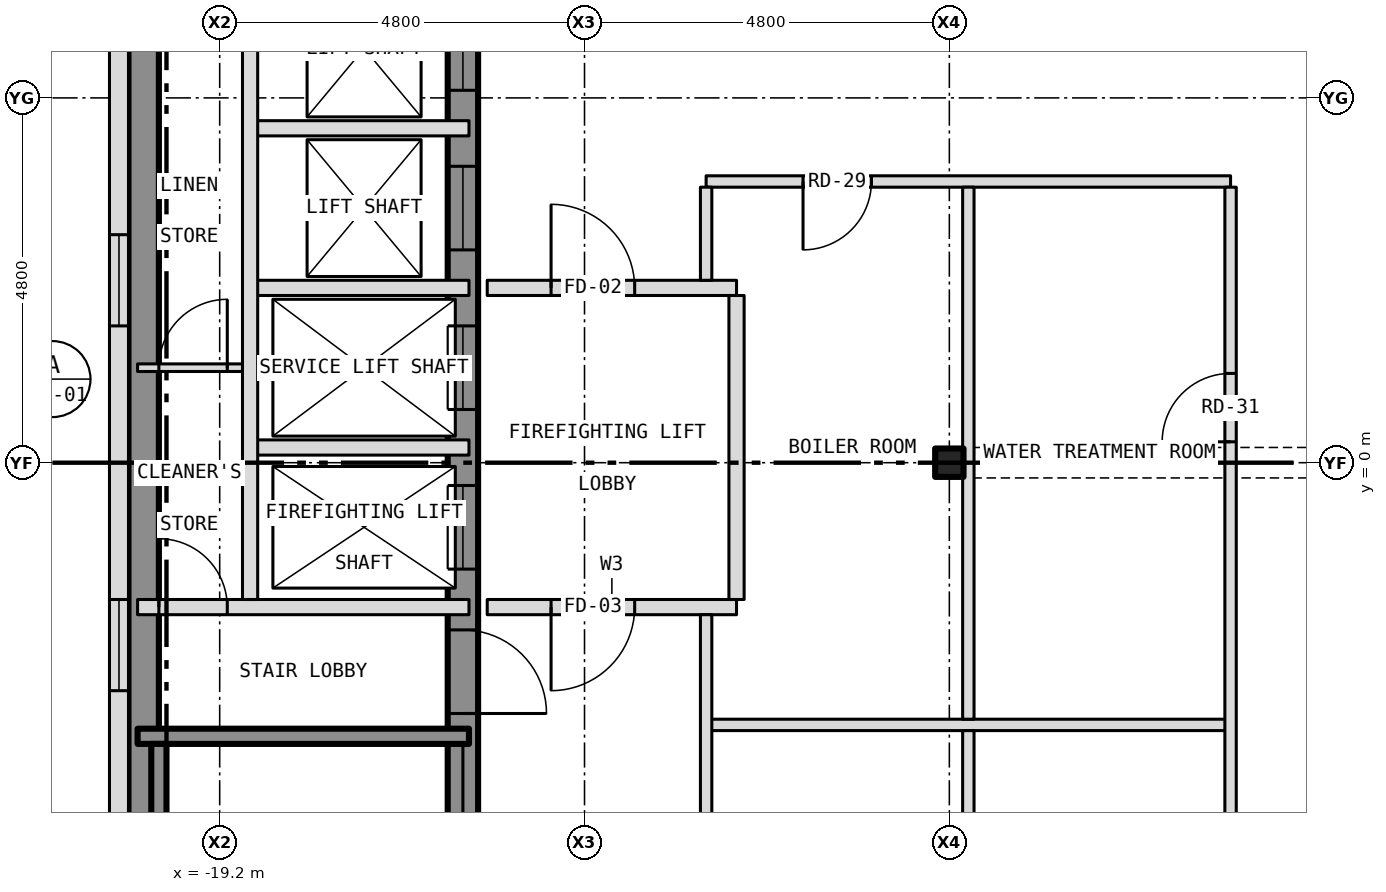
"""IFC4 building model, lengths in metres.
Left out: names, types, materials, properties, quantities, classifications, styles, units other than length and angle.
Written with IfcOpenShell. Run it as: python <this file> out.ifc"""

import sys

from ifc_helpers import new_model, si_unit, direction, frame, frame_2d, origin, origin_2d, place, context, subcontext, project, spatial, rectangle, i_section, extrude, element, fill, save


model = new_model("IFC4")
c1 = context("Model", 3, precision=1e-05, world=origin(), true_north=direction((0.0, 1.0)))
c2 = subcontext(c1, "Body", "Model", "MODEL_VIEW")
j1 = project(units=[si_unit("LENGTHUNIT", "METRE"), si_unit("PLANEANGLEUNIT", "RADIAN")], contexts=[c1])
p1 = place(None, origin())
s1 = spatial("IfcSite", under=j1, at=p1, CompositionType="ELEMENT")
p2 = place(p1, origin())
s2 = spatial("IfcBuilding", under=s1, at=p2, CompositionType="ELEMENT")
p3 = place(p2, frame((0.0, 0.0, 236.5)))
s3 = spatial("IfcBuildingStorey", under=s2, at=p3, CompositionType="ELEMENT", Elevation=236.5)
p4 = place(p3, frame((-9.6, 0.0, -0.3), z_axis=(0.0, 0.0, 1.0), x_axis=(1.0, 0.0, 0.0)))
e1 = element("IfcColumn", 1, at=p4, inside=s3, PredefinedType="COLUMN", context=c2, shape_type="SweptSolid", body=[
    extrude(i_section(OverallWidth=0.373, OverallDepth=0.373, WebThickness=0.016, FlangeThickness=0.026, at=origin_2d()), origin(), (0.0, 0.0, 1.0), 4.65),
])
p5 = place(p3, frame((-16.0, -10.8, 0.0), z_axis=(0.0, 0.0, 1.0), x_axis=(0.0, 1.0, 0.0)))
e2 = element("IfcWall", 2, at=p5, inside=s3, PredefinedType="SHEAR", context=c2, shape_type="SweptSolid", body=[
    extrude(rectangle(XDim=21.6, YDim=0.4, at=frame_2d((10.8, 0.0))), origin(), (0.0, 0.0, 1.0), 3.9),
])
p6 = place(p5, frame((9.4, 0.0, 0.0)))
e3 = element("IfcOpeningElement", 3, at=p6, cuts=e2, PredefinedType="OPENING", context=c2, shape_type="SweptSolid", body=[
    extrude(rectangle(XDim=1.1, YDim=2.1, at=frame_2d((0.55, 1.05))), frame((0.0, 0.212, 0.0), z_axis=(0.0, -1.0, 0.0), x_axis=(1.0, 0.0, 0.0)), (0.0, 0.0, 1.0), 0.424),
])
p7 = place(p5, frame((11.5, 0.0, 0.0)))
e4 = element("IfcOpeningElement", 4, at=p7, cuts=e2, PredefinedType="OPENING", context=c2, shape_type="SweptSolid", body=[
    extrude(rectangle(XDim=1.1, YDim=2.1, at=frame_2d((0.55, 1.05))), frame((0.0, 0.212, 0.0), z_axis=(0.0, -1.0, 0.0), x_axis=(1.0, 0.0, 0.0)), (0.0, 0.0, 1.0), 0.424),
])
p8 = place(p5, frame((13.6, 0.0, 0.0)))
e5 = element("IfcOpeningElement", 5, at=p8, cuts=e2, PredefinedType="OPENING", context=c2, shape_type="SweptSolid", body=[
    extrude(rectangle(XDim=1.1, YDim=2.1, at=frame_2d((0.55, 1.05))), frame((0.0, 0.212, 0.0), z_axis=(0.0, -1.0, 0.0), x_axis=(1.0, 0.0, 0.0)), (0.0, 0.0, 1.0), 0.424),
])
p9 = place(p5, frame((15.7, 0.0, 0.0)))
e6 = element("IfcOpeningElement", 6, at=p9, cuts=e2, PredefinedType="OPENING", context=c2, shape_type="SweptSolid", body=[
    extrude(rectangle(XDim=1.1, YDim=2.1, at=frame_2d((0.55, 1.05))), frame((0.0, 0.212, 0.0), z_axis=(0.0, -1.0, 0.0), x_axis=(1.0, 0.0, 0.0)), (0.0, 0.0, 1.0), 0.424),
])
p10 = place(p5, frame((17.8, 0.0, 0.0)))
e7 = element("IfcOpeningElement", 7, at=p10, cuts=e2, PredefinedType="OPENING", context=c2, shape_type="SweptSolid", body=[
    extrude(rectangle(XDim=1.1, YDim=2.1, at=frame_2d((0.55, 1.05))), frame((0.0, 0.212, 0.0), z_axis=(0.0, -1.0, 0.0), x_axis=(1.0, 0.0, 0.0)), (0.0, 0.0, 1.0), 0.424),
])
p11 = place(p5, frame((0.458, 0.0, 0.0)))
e8 = element("IfcOpeningElement", 8, at=p11, cuts=e2, PredefinedType="OPENING", context=c2, shape_type="SweptSolid", body=[
    extrude(rectangle(XDim=1.1, YDim=2.1, at=frame_2d((0.55, 1.05))), frame((0.0, 0.212, 0.0), z_axis=(0.0, -1.0, 0.0), x_axis=(1.0, 0.0, 0.0)), (0.0, 0.0, 1.0), 0.424),
])
p12 = place(p5, frame((7.5, 0.0, 0.0)))
e9 = element("IfcOpeningElement", 9, at=p12, cuts=e2, PredefinedType="OPENING", context=c2, shape_type="SweptSolid", body=[
    extrude(rectangle(XDim=1.1, YDim=2.1, at=frame_2d((0.55, 1.05))), frame((0.0, 0.212, 0.0), z_axis=(0.0, -1.0, 0.0), x_axis=(1.0, 0.0, 0.0)), (0.0, 0.0, 1.0), 0.424),
])
p13 = place(p5, frame((20.0, 0.0, 0.0)))
e10 = element("IfcOpeningElement", 10, at=p13, cuts=e2, PredefinedType="OPENING", context=c2, shape_type="SweptSolid", body=[
    extrude(rectangle(XDim=0.9, YDim=2.1, at=frame_2d((0.45, 1.05))), frame((0.0, 0.212, 0.0), z_axis=(0.0, -1.0, 0.0), x_axis=(1.0, 0.0, 0.0)), (0.0, 0.0, 1.0), 0.424),
])
p14 = place(p3, frame((-20.2, -10.8, 0.0), z_axis=(0.0, 0.0, 1.0), x_axis=(0.0, 1.0, 0.0)))
e11 = element("IfcWall", 11, at=p14, inside=s3, PredefinedType="SHEAR", context=c2, shape_type="SweptSolid", body=[
    extrude(rectangle(XDim=21.6, YDim=0.4, at=frame_2d((10.8, 0.0))), origin(), (0.0, 0.0, 1.0), 3.9),
])
p15 = place(p3, frame((-20.525, 10.8, 0.0), z_axis=(0.0, 0.0, 1.0), x_axis=(0.0, -1.0, 0.0)))
e12 = element("IfcWall", 12, at=p15, inside=s3, PredefinedType="SOLIDWALL", context=c2, shape_type="SweptSolid", body=[
    extrude(rectangle(XDim=21.6, YDim=0.25, at=frame_2d((10.8, 0.0))), origin(), (0.0, 0.0, 1.0), 4.5),
])
p16 = place(p15, frame((3.0, 0.0, 2.2)))
e13 = element("IfcOpeningElement", 13, at=p16, cuts=e12, PredefinedType="OPENING", context=c2, shape_type="SweptSolid", body=[
    extrude(rectangle(XDim=1.2, YDim=0.6, at=frame_2d((0.6, 0.3))), frame((0.0, 0.137, 0.0), z_axis=(0.0, -1.0, 0.0), x_axis=(1.0, 0.0, 0.0)), (0.0, 0.0, 1.0), 0.274),
])
p17 = place(p15, frame((7.8, 0.0, 2.2)))
e14 = element("IfcOpeningElement", 14, at=p17, cuts=e12, PredefinedType="OPENING", context=c2, shape_type="SweptSolid", body=[
    extrude(rectangle(XDim=1.2, YDim=0.6, at=frame_2d((0.6, 0.3))), frame((0.0, 0.137, 0.0), z_axis=(0.0, -1.0, 0.0), x_axis=(1.0, 0.0, 0.0)), (0.0, 0.0, 1.0), 0.274),
])
p18 = place(p15, frame((12.6, 0.0, 2.2)))
e15 = element("IfcOpeningElement", 15, at=p18, cuts=e12, PredefinedType="OPENING", context=c2, shape_type="SweptSolid", body=[
    extrude(rectangle(XDim=1.2, YDim=0.6, at=frame_2d((0.6, 0.3))), frame((0.0, 0.137, 0.0), z_axis=(0.0, -1.0, 0.0), x_axis=(1.0, 0.0, 0.0)), (0.0, 0.0, 1.0), 0.274),
])
p19 = place(p15, frame((17.4, 0.0, 2.2)))
e16 = element("IfcOpeningElement", 16, at=p19, cuts=e12, PredefinedType="OPENING", context=c2, shape_type="SweptSolid", body=[
    extrude(rectangle(XDim=1.2, YDim=0.6, at=frame_2d((0.6, 0.3))), frame((0.0, 0.137, 0.0), z_axis=(0.0, -1.0, 0.0), x_axis=(1.0, 0.0, 0.0)), (0.0, 0.0, 1.0), 0.274),
])
p20 = place(p3, frame((-20.28, -3.6, 0.0), z_axis=(0.0, 0.0, 1.0), x_axis=(1.0, 0.0, 0.0)))
e17 = element("IfcWall", 17, at=p20, inside=s3, PredefinedType="SHEAR", context=c2, shape_type="SweptSolid", body=[
    extrude(rectangle(XDim=4.36, YDim=0.2, at=frame_2d((2.18, 0.0))), origin(), (0.0, 0.0, 1.0), 3.9),
])
p21 = place(p3, frame((-12.8, -3.45, 0.0), z_axis=(0.0, 0.0, 1.0), x_axis=(1.0, 0.0, 0.0)))
e18 = element("IfcWall", 18, at=p21, inside=s3, PredefinedType="PARTITIONING", context=c2, shape_type="SweptSolid", body=[
    extrude(rectangle(XDim=6.9, YDim=0.15, at=frame_2d((3.45, 0.0))), origin(), (0.0, 0.0, 1.0), 4.35),
])
p22 = place(p3, frame((-20.28, -1.9, 0.0), z_axis=(0.0, 0.0, 1.0), x_axis=(1.0, 0.0, 0.0)))
e19 = element("IfcWall", 19, at=p22, inside=s3, PredefinedType="PARTITIONING", context=c2, shape_type="SweptSolid", body=[
    extrude(rectangle(XDim=4.36, YDim=0.2, at=frame_2d((2.18, 0.0))), origin(), (0.0, 0.0, 1.0), 3.9),
])
p23 = place(p22, frame((0.28, 0.0, 0.0)))
e20 = element("IfcOpeningElement", 20, at=p23, cuts=e19, PredefinedType="OPENING", context=c2, shape_type="SweptSolid", body=[
    extrude(rectangle(XDim=0.9, YDim=2.1, at=frame_2d((0.45, 1.05))), frame((0.0, 0.112, 0.0), z_axis=(0.0, -1.0, 0.0), x_axis=(1.0, 0.0, 0.0)), (0.0, 0.0, 1.0), 0.224),
])
p24 = place(p3, frame((-15.68, -1.9, 0.0), z_axis=(0.0, 0.0, 1.0), x_axis=(1.0, 0.0, 0.0)))
e21 = element("IfcWall", 21, at=p24, inside=s3, PredefinedType="PARTITIONING", context=c2, shape_type="SweptSolid", body=[
    extrude(rectangle(XDim=3.28, YDim=0.2, at=frame_2d((1.64, 0.0))), origin(), (0.0, 0.0, 1.0), 4.35),
])
p25 = place(p24, frame((0.84, 0.0, 0.0)))
e22 = element("IfcOpeningElement", 22, at=p25, cuts=e21, PredefinedType="OPENING", context=c2, shape_type="SweptSolid", body=[
    extrude(rectangle(XDim=1.1, YDim=2.1, at=frame_2d((0.55, 1.05))), frame((0.0, 0.112, 0.0), z_axis=(0.0, -1.0, 0.0), x_axis=(1.0, 0.0, 0.0)), (0.0, 0.0, 1.0), 0.224),
])
p26 = place(p3, frame((-18.8, 0.2, 0.0), z_axis=(0.0, 0.0, 1.0), x_axis=(1.0, 0.0, 0.0)))
e23 = element("IfcWall", 23, at=p26, inside=s3, PredefinedType="PARTITIONING", context=c2, shape_type="SweptSolid", body=[
    extrude(rectangle(XDim=2.88, YDim=0.2, at=frame_2d((1.44, 0.0))), origin(), (0.0, 0.0, 1.0), 3.9),
])
p27 = place(p3, frame((-20.28, 1.25, 0.0), z_axis=(0.0, 0.0, 1.0), x_axis=(1.0, 0.0, 0.0)))
e24 = element("IfcWall", 24, at=p27, inside=s3, PredefinedType="PARTITIONING", context=c2, shape_type="SweptSolid", body=[
    extrude(rectangle(XDim=1.48, YDim=0.1, at=frame_2d((0.74, 0.0))), origin(), (0.0, 0.0, 1.0), 3.9),
])
p28 = place(p27, frame((0.28, 0.0, 0.0)))
e25 = element("IfcOpeningElement", 25, at=p28, cuts=e24, PredefinedType="OPENING", context=c2, shape_type="SweptSolid", body=[
    extrude(rectangle(XDim=0.9, YDim=2.1, at=frame_2d((0.45, 1.05))), frame((0.0, 0.062, 0.0), z_axis=(0.0, -1.0, 0.0), x_axis=(1.0, 0.0, 0.0)), (0.0, 0.0, 1.0), 0.124),
])
p29 = place(p3, frame((-18.8, 2.3, 0.0), z_axis=(0.0, 0.0, 1.0), x_axis=(1.0, 0.0, 0.0)))
e26 = element("IfcWall", 26, at=p29, inside=s3, PredefinedType="PARTITIONING", context=c2, shape_type="SweptSolid", body=[
    extrude(rectangle(XDim=2.88, YDim=0.2, at=frame_2d((1.44, 0.0))), origin(), (0.0, 0.0, 1.0), 3.9),
])
p30 = place(p3, frame((-15.68, 2.3, 0.0), z_axis=(0.0, 0.0, 1.0), x_axis=(1.0, 0.0, 0.0)))
e27 = element("IfcWall", 27, at=p30, inside=s3, PredefinedType="PARTITIONING", context=c2, shape_type="SweptSolid", body=[
    extrude(rectangle(XDim=3.28, YDim=0.2, at=frame_2d((1.64, 0.0))), origin(), (0.0, 0.0, 1.0), 4.35),
])
p31 = place(p30, frame((0.84, 0.0, 0.0)))
e28 = element("IfcOpeningElement", 28, at=p31, cuts=e27, PredefinedType="OPENING", context=c2, shape_type="SweptSolid", body=[
    extrude(rectangle(XDim=1.1, YDim=2.1, at=frame_2d((0.55, 1.05))), frame((0.0, 0.112, 0.0), z_axis=(0.0, -1.0, 0.0), x_axis=(1.0, 0.0, 0.0)), (0.0, 0.0, 1.0), 0.224),
])
p32 = place(p3, frame((-12.8, 3.7, 0.0), z_axis=(0.0, 0.0, 1.0), x_axis=(1.0, 0.0, 0.0)))
e29 = element("IfcWall", 29, at=p32, inside=s3, PredefinedType="PARTITIONING", context=c2, shape_type="SweptSolid", body=[
    extrude(rectangle(XDim=6.9, YDim=0.15, at=frame_2d((3.45, 0.0))), origin(), (0.0, 0.0, 1.0), 4.35),
])
p33 = place(p32, frame((1.275, 0.0, 0.0)))
e30 = element("IfcOpeningElement", 30, at=p33, cuts=e29, PredefinedType="OPENING", context=c2, shape_type="SweptSolid", body=[
    extrude(rectangle(XDim=0.9, YDim=2.1, at=frame_2d((0.45, 1.05))), frame((0.0, 0.087, 0.0), z_axis=(0.0, -1.0, 0.0), x_axis=(1.0, 0.0, 0.0)), (0.0, 0.0, 1.0), 0.174),
])
p34 = place(p3, frame((-18.8, 4.4, 0.0), z_axis=(0.0, 0.0, 1.0), x_axis=(1.0, 0.0, 0.0)))
e31 = element("IfcWall", 31, at=p34, inside=s3, PredefinedType="PARTITIONING", context=c2, shape_type="SweptSolid", body=[
    extrude(rectangle(XDim=2.88, YDim=0.2, at=frame_2d((1.44, 0.0))), origin(), (0.0, 0.0, 1.0), 3.9),
])
p35 = place(p3, frame((-20.0, -10.68, 0.0), z_axis=(0.0, 0.0, 1.0), x_axis=(0.0, 1.0, 0.0)))
e32 = element("IfcWall", 32, at=p35, inside=s3, PredefinedType="SHEAR", context=c2, shape_type="SweptSolid", body=[
    extrude(rectangle(XDim=6.98, YDim=0.2, at=frame_2d((3.49, 0.0))), origin(), (0.0, 0.0, 1.0), 3.9),
])
p36 = place(p3, frame((-18.8, -1.8, 0.0), z_axis=(0.0, 0.0, 1.0), x_axis=(0.0, 1.0, 0.0)))
e33 = element("IfcWall", 33, at=p36, inside=s3, PredefinedType="PARTITIONING", context=c2, shape_type="SweptSolid", body=[
    extrude(rectangle(XDim=12.48, YDim=0.2, at=frame_2d((6.24, 0.0))), origin(), (0.0, 0.0, 1.0), 3.9),
])
p37 = place(p3, frame((-12.8, -10.525, 0.0), z_axis=(0.0, 0.0, 1.0), x_axis=(0.0, 1.0, 0.0)))
e34 = element("IfcWall", 34, at=p37, inside=s3, PredefinedType="PARTITIONING", context=c2, shape_type="SweptSolid", body=[
    extrude(rectangle(XDim=8.525, YDim=0.15, at=frame_2d((4.262, 0.0))), origin(), (0.0, 0.0, 1.0), 4.35),
])
p38 = place(p37, frame((3.05, 0.0, 0.0)))
e35 = element("IfcOpeningElement", 35, at=p38, cuts=e34, PredefinedType="OPENING", context=c2, shape_type="SweptSolid", body=[
    extrude(rectangle(XDim=0.9, YDim=2.1, at=frame_2d((0.45, 1.05))), frame((0.0, 0.087, 0.0), z_axis=(0.0, -1.0, 0.0), x_axis=(1.0, 0.0, 0.0)), (0.0, 0.0, 1.0), 0.174),
])
p39 = place(p3, frame((-12.8, 2.4, 0.0), z_axis=(0.0, 0.0, 1.0), x_axis=(0.0, 1.0, 0.0)))
e36 = element("IfcWall", 36, at=p39, inside=s3, PredefinedType="PARTITIONING", context=c2, shape_type="SweptSolid", body=[
    extrude(rectangle(XDim=1.225, YDim=0.15, at=frame_2d((0.613, 0.0))), origin(), (0.0, 0.0, 1.0), 4.35),
])
p40 = place(p3, frame((-12.4, -1.8, 0.0), z_axis=(0.0, 0.0, 1.0), x_axis=(0.0, 1.0, 0.0)))
e37 = element("IfcWall", 37, at=p40, inside=s3, PredefinedType="PARTITIONING", context=c2, shape_type="SweptSolid", body=[
    extrude(rectangle(XDim=4.0, YDim=0.2, at=frame_2d((2.0, 0.0))), origin(), (0.0, 0.0, 1.0), 4.35),
])
for number, where, z_axis, x_axis in (
    (38, (-9.35, -10.525, 0.0), (0.0, 0.0, 1.0), (0.0, 1.0, 0.0)),
    (39, (-9.35, -3.375, 0.0), (0.0, 0.0, 1.0), (0.0, 1.0, 0.0)),
):
    element("IfcWall", number, at=place(p3, frame(where, z_axis=z_axis, x_axis=x_axis)), inside=s3, PredefinedType="PARTITIONING", context=c2, shape_type="SweptSolid", body=[
        extrude(rectangle(XDim=7.0, YDim=0.15, at=frame_2d((3.5, 0.0))), origin(), (0.0, 0.0, 1.0), 4.35),
    ])
p41 = place(p3, frame((-5.9, -10.525, 0.0), z_axis=(0.0, 0.0, 1.0), x_axis=(0.0, 1.0, 0.0)))
e40 = element("IfcWall", 40, at=p41, inside=s3, PredefinedType="PARTITIONING", context=c2, shape_type="SweptSolid", body=[
    extrude(rectangle(XDim=14.15, YDim=0.15, at=frame_2d((7.075, 0.0))), origin(), (0.0, 0.0, 1.0), 4.35),
])
p42 = place(p41, frame((3.05, 0.0, 0.0)))
e41 = element("IfcOpeningElement", 41, at=p42, cuts=e40, PredefinedType="OPENING", context=c2, shape_type="SweptSolid", body=[
    extrude(rectangle(XDim=0.9, YDim=2.1, at=frame_2d((0.45, 1.05))), frame((0.0, 0.087, 0.0), z_axis=(0.0, -1.0, 0.0), x_axis=(1.0, 0.0, 0.0)), (0.0, 0.0, 1.0), 0.174),
])
p43 = place(p41, frame((10.8, 0.0, 0.0)))
e42 = element("IfcOpeningElement", 42, at=p43, cuts=e40, PredefinedType="OPENING", context=c2, shape_type="SweptSolid", body=[
    extrude(rectangle(XDim=0.9, YDim=2.1, at=frame_2d((0.45, 1.05))), frame((0.0, 0.087, 0.0), z_axis=(0.0, -1.0, 0.0), x_axis=(1.0, 0.0, 0.0)), (0.0, 0.0, 1.0), 0.174),
])
p44 = place(p17, origin())
e43 = element("IfcWindow", 43, at=p44, inside=s3, PartitioningType="SINGLE_PANEL", PredefinedType="WINDOW", context=c2, shape_type="SweptSolid", body=[
    extrude(rectangle(XDim=1.2, YDim=0.6, at=frame_2d((0.6, 0.3))), frame((0.0, -0.035, 0.0), z_axis=(0.0, -1.0, 0.0), x_axis=(1.0, 0.0, 0.0)), (0.0, 0.0, 1.0), 0.06),
])
fill(e14, e43)
p45 = place(p18, origin())
e44 = element("IfcWindow", 44, at=p45, inside=s3, PartitioningType="SINGLE_PANEL", PredefinedType="WINDOW", context=c2, shape_type="SweptSolid", body=[
    extrude(rectangle(XDim=1.2, YDim=0.6, at=frame_2d((0.6, 0.3))), frame((0.0, -0.035, 0.0), z_axis=(0.0, -1.0, 0.0), x_axis=(1.0, 0.0, 0.0)), (0.0, 0.0, 1.0), 0.06),
])
fill(e15, e44)
p46 = place(p6, origin())
e45 = element("IfcDoor", 45, at=p46, inside=s3, OperationType="SLIDING_TO_LEFT", PredefinedType="DOOR", context=c2, shape_type="SweptSolid", body=[
    extrude(rectangle(XDim=1.1, YDim=2.1, at=frame_2d((0.55, 1.05))), frame((0.0, 0.025, 0.0), z_axis=(0.0, -1.0, 0.0), x_axis=(1.0, 0.0, 0.0)), (0.0, 0.0, 1.0), 0.05),
])
fill(e3, e45)
p47 = place(p7, origin())
e46 = element("IfcDoor", 46, at=p47, inside=s3, OperationType="SLIDING_TO_LEFT", PredefinedType="DOOR", context=c2, shape_type="SweptSolid", body=[
    extrude(rectangle(XDim=1.1, YDim=2.1, at=frame_2d((0.55, 1.05))), frame((0.0, 0.025, 0.0), z_axis=(0.0, -1.0, 0.0), x_axis=(1.0, 0.0, 0.0)), (0.0, 0.0, 1.0), 0.05),
])
fill(e4, e46)
p48 = place(p8, origin())
e47 = element("IfcDoor", 47, at=p48, inside=s3, OperationType="SLIDING_TO_LEFT", PredefinedType="DOOR", context=c2, shape_type="SweptSolid", body=[
    extrude(rectangle(XDim=1.1, YDim=2.1, at=frame_2d((0.55, 1.05))), frame((0.0, 0.025, 0.0), z_axis=(0.0, -1.0, 0.0), x_axis=(1.0, 0.0, 0.0)), (0.0, 0.0, 1.0), 0.05),
])
fill(e5, e47)
p49 = place(p9, origin())
e48 = element("IfcDoor", 48, at=p49, inside=s3, OperationType="SLIDING_TO_LEFT", PredefinedType="DOOR", context=c2, shape_type="SweptSolid", body=[
    extrude(rectangle(XDim=1.1, YDim=2.1, at=frame_2d((0.55, 1.05))), frame((0.0, 0.025, 0.0), z_axis=(0.0, -1.0, 0.0), x_axis=(1.0, 0.0, 0.0)), (0.0, 0.0, 1.0), 0.05),
])
fill(e6, e48)
p50 = place(p12, origin())
e49 = element("IfcDoor", 49, at=p50, inside=s3, OperationType="SINGLE_SWING_LEFT", PredefinedType="DOOR", context=c2, shape_type="SweptSolid", body=[
    extrude(rectangle(XDim=1.1, YDim=2.1, at=frame_2d((0.55, 1.05))), frame((0.0, 0.025, 0.0), z_axis=(0.0, -1.0, 0.0), x_axis=(1.0, 0.0, 0.0)), (0.0, 0.0, 1.0), 0.05),
])
fill(e9, e49)
p51 = place(p23, origin())
e50 = element("IfcDoor", 50, at=p51, inside=s3, OperationType="SINGLE_SWING_LEFT", PredefinedType="DOOR", context=c2, shape_type="SweptSolid", body=[
    extrude(rectangle(XDim=0.9, YDim=2.1, at=frame_2d((0.45, 1.05))), frame((0.0, 0.025, 0.0), z_axis=(0.0, -1.0, 0.0), x_axis=(1.0, 0.0, 0.0)), (0.0, 0.0, 1.0), 0.05),
])
fill(e20, e50)
p52 = place(p28, origin())
e51 = element("IfcDoor", 51, at=p52, inside=s3, OperationType="SINGLE_SWING_RIGHT", PredefinedType="DOOR", context=c2, shape_type="SweptSolid", body=[
    extrude(rectangle(XDim=0.9, YDim=2.1, at=frame_2d((0.45, 1.05))), frame((0.0, 0.025, 0.0), z_axis=(0.0, -1.0, 0.0), x_axis=(1.0, 0.0, 0.0)), (0.0, 0.0, 1.0), 0.05),
])
fill(e25, e51)
p53 = place(p31, origin())
e52 = element("IfcDoor", 52, at=p53, inside=s3, OperationType="SINGLE_SWING_LEFT", PredefinedType="DOOR", context=c2, shape_type="SweptSolid", body=[
    extrude(rectangle(XDim=1.1, YDim=2.1, at=frame_2d((0.55, 1.05))), frame((0.0, 0.025, 0.0), z_axis=(0.0, -1.0, 0.0), x_axis=(1.0, 0.0, 0.0)), (0.0, 0.0, 1.0), 0.05),
])
fill(e28, e52)
p54 = place(p25, origin())
e53 = element("IfcDoor", 53, at=p54, inside=s3, OperationType="SINGLE_SWING_LEFT", PredefinedType="DOOR", context=c2, shape_type="SweptSolid", body=[
    extrude(rectangle(XDim=1.1, YDim=2.1, at=frame_2d((0.55, 1.05))), frame((0.0, 0.025, 0.0), z_axis=(0.0, -1.0, 0.0), x_axis=(1.0, 0.0, 0.0)), (0.0, 0.0, 1.0), 0.05),
])
fill(e22, e53)
p55 = place(p33, origin())
e54 = element("IfcDoor", 54, at=p55, inside=s3, OperationType="SINGLE_SWING_LEFT", PredefinedType="DOOR", context=c2, shape_type="SweptSolid", body=[
    extrude(rectangle(XDim=0.9, YDim=2.1, at=frame_2d((0.45, 1.05))), frame((0.0, 0.025, 0.0), z_axis=(0.0, -1.0, 0.0), x_axis=(1.0, 0.0, 0.0)), (0.0, 0.0, 1.0), 0.05),
])
fill(e30, e54)
p56 = place(p43, origin())
e55 = element("IfcDoor", 55, at=p56, inside=s3, OperationType="SINGLE_SWING_LEFT", PredefinedType="DOOR", context=c2, shape_type="SweptSolid", body=[
    extrude(rectangle(XDim=0.9, YDim=2.1, at=frame_2d((0.45, 1.05))), frame((0.0, 0.025, 0.0), z_axis=(0.0, -1.0, 0.0), x_axis=(1.0, 0.0, 0.0)), (0.0, 0.0, 1.0), 0.05),
])
fill(e42, e55)
save(model, sys.argv[1])
